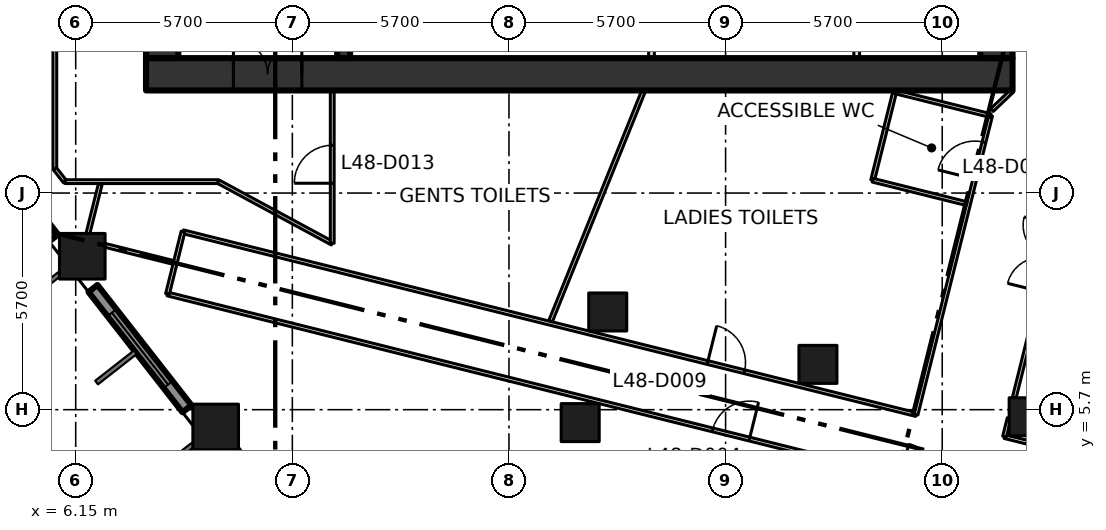
"""IFC4 building model, lengths in metres.
Left out: names, types, materials, properties, quantities, classifications, styles, units other than length and angle.
Written with IfcOpenShell. Run it as: python <this file> out.ifc"""

import sys

from ifc_helpers import new_model, si_unit, direction, frame, frame_2d, origin, origin_2d, place, context, subcontext, project, spatial, rectangle, extrude, element, fill, save


model = new_model("IFC4")
c1 = context("Model", 3, precision=1e-05, world=origin(), true_north=direction((0.0, 1.0)))
c2 = subcontext(c1, "Body", "Model", "MODEL_VIEW")
j1 = project(units=[si_unit("LENGTHUNIT", "METRE"), si_unit("PLANEANGLEUNIT", "RADIAN")], contexts=[c1])
p1 = place(None, origin())
s1 = spatial("IfcSite", under=j1, at=p1, CompositionType="ELEMENT")
p2 = place(p1, origin())
s2 = spatial("IfcBuilding", under=s1, at=p2, CompositionType="ELEMENT")
p3 = place(p2, frame((0.0, 0.0, 211.8)))
s3 = spatial("IfcBuildingStorey", under=s2, at=p3, CompositionType="ELEMENT", Elevation=211.8)
for number, where, z_axis, x_axis in (
    (1, (9.833, 5.245, 0.0), (0.0, 0.0, 1.0), (1.0, 0.0, 0.0)),
    (2, (6.323, 9.737, 0.0), (0.0, 0.0, 1.0), (1.0, 0.0, 0.0)),
):
    element("IfcColumn", number, at=place(p3, frame(where, z_axis=z_axis, x_axis=x_axis)), inside=s3, PredefinedType="COLUMN", context=c2, shape_type="SweptSolid", body=[
        extrude(rectangle(XDim=1.2, YDim=1.2, at=origin_2d()), origin(), (0.0, 0.0, 1.0), 4.2),
    ])
for number, where, z_axis, x_axis in (
    (3, (19.424, 5.36, 0.0), (0.0, 0.0, 1.0), (1.0, 0.0, 0.0)),
    (4, (20.149, 8.271, 0.0), (0.0, 0.0, 1.0), (1.0, 0.0, 0.0)),
    (5, (25.68, 6.892, 0.0), (0.0, 0.0, 1.0), (1.0, 0.0, 0.0)),
    (6, (31.211, 5.513, 0.0), (0.0, 0.0, 1.0), (1.0, 0.0, 0.0)),
):
    element("IfcColumn", number, at=place(p3, frame(where, z_axis=z_axis, x_axis=x_axis)), inside=s3, PredefinedType="COLUMN", context=c2, shape_type="SweptSolid", body=[
        extrude(rectangle(XDim=1.0, YDim=1.0, at=origin_2d()), origin(), (0.0, 0.0, 1.0), 4.2),
    ])
p4 = place(p3, frame((8.0, 14.525, -0.3), z_axis=(0.0, 0.0, 1.0), x_axis=(1.0, 0.0, 0.0)))
e7 = element("IfcWall", 7, at=p4, inside=s3, PredefinedType="SHEAR", context=c2, shape_type="SweptSolid", body=[
    extrude(rectangle(XDim=22.8, YDim=0.85, at=frame_2d((11.4, 0.0))), origin(), (0.0, 0.0, 1.0), 4.2),
])
p5 = place(p4, frame((2.3, 0.0, 0.3)))
e8 = element("IfcOpeningElement", 8, at=p5, cuts=e7, PredefinedType="OPENING", context=c2, shape_type="SweptSolid", body=[
    extrude(rectangle(XDim=1.8, YDim=2.1, at=frame_2d((0.9, 1.05))), frame((0.0, 0.435, 0.0), z_axis=(0.0, -1.0, 0.0), x_axis=(1.0, 0.0, 0.0)), (0.0, 0.0, 1.0), 0.87),
])
for number, where, z_axis, x_axis in (
    (9, (8.425, 14.95, -0.3), (0.0, 0.0, 1.0), (0.0, 1.0, 0.0)),
    (10, (30.375, 14.95, -0.3), (0.0, 0.0, 1.0), (0.0, 1.0, 0.0)),
):
    element("IfcWall", number, at=place(p3, frame(where, z_axis=z_axis, x_axis=x_axis)), inside=s3, PredefinedType="SHEAR", context=c2, shape_type="SweptSolid", body=[
        extrude(rectangle(XDim=20.75, YDim=0.85, at=frame_2d((10.375, 0.0))), origin(), (0.0, 0.0, 1.0), 4.2),
    ])
p6 = place(p3, frame((13.2, 14.95, 0.0), z_axis=(0.0, 0.0, 1.0), x_axis=(0.0, 1.0, 0.0)))
e11 = element("IfcWall", 11, at=p6, inside=s3, PredefinedType="SHEAR", context=c2, shape_type="SweptSolid", body=[
    extrude(rectangle(XDim=20.75, YDim=0.34, at=frame_2d((10.375, 0.0))), origin(), (0.0, 0.0, 1.0), 3.9),
])
p7 = place(p6, frame((3.35, 0.0, 0.0)))
e12 = element("IfcOpeningElement", 12, at=p7, cuts=e11, PredefinedType="OPENING", context=c2, shape_type="SweptSolid", body=[
    extrude(rectangle(XDim=1.8, YDim=2.1, at=frame_2d((0.9, 1.05))), frame((0.0, 0.18, 0.0), z_axis=(0.0, -1.0, 0.0), x_axis=(1.0, 0.0, 0.0)), (0.0, 0.0, 1.0), 0.36),
])
p8 = place(p6, frame((11.45, 0.0, 0.0)))
e13 = element("IfcOpeningElement", 13, at=p8, cuts=e11, PredefinedType="OPENING", context=c2, shape_type="SweptSolid", body=[
    extrude(rectangle(XDim=1.2, YDim=2.1, at=frame_2d((0.6, 1.05))), frame((0.0, 0.18, 0.0), z_axis=(0.0, -1.0, 0.0), x_axis=(1.0, 0.0, 0.0)), (0.0, 0.0, 1.0), 0.36),
])
for number, where, z_axis, x_axis in (
    (14, (21.3, 14.95, 0.0), (0.0, 0.0, 1.0), (0.0, 1.0, 0.0)),
    (15, (26.7, 14.95, 0.0), (0.0, 0.0, 1.0), (0.0, 1.0, 0.0)),
):
    element("IfcWall", number, at=place(p3, frame(where, z_axis=z_axis, x_axis=x_axis)), inside=s3, PredefinedType="PARTITIONING", context=c2, shape_type="SweptSolid", body=[
        extrude(rectangle(XDim=2.675, YDim=0.15, at=frame_2d((1.337, 0.0))), origin(), (0.0, 0.0, 1.0), 3.9),
    ])
p9 = place(p3, frame((3.096, 13.381, 0.0), z_axis=(0.0, 0.0, 1.0), x_axis=(0.615563820493, -0.78808704018, 0.0)))
e16 = element("IfcWall", 16, at=p9, inside=s3, PredefinedType="SOLIDWALL", context=c2, shape_type="SweptSolid", body=[
    extrude(rectangle(XDim=4.016, YDim=0.3, at=frame_2d((2.008, 0.0))), origin(), (0.0, 0.0, 1.0), 3.15),
])
p10 = place(p9, frame((0.808, 0.0, 0.8)))
e17 = element("IfcOpeningElement", 17, at=p10, cuts=e16, PredefinedType="OPENING", context=c2, shape_type="SweptSolid", body=[
    extrude(rectangle(XDim=2.4, YDim=2.1, at=frame_2d((1.2, 1.05))), frame((0.0, 0.16, 0.0), z_axis=(0.0, -1.0, 0.0), x_axis=(1.0, 0.0, 0.0)), (0.0, 0.0, 1.0), 0.32),
])
p11 = place(p3, frame((6.605, 8.889, 0.0), z_axis=(0.0, 0.0, 1.0), x_axis=(0.615706559089, -0.787975528233, 0.0)))
e18 = element("IfcWall", 18, at=p11, inside=s3, PredefinedType="SOLIDWALL", context=c2, shape_type="SweptSolid", body=[
    extrude(rectangle(XDim=4.016, YDim=0.3, at=frame_2d((2.008, 0.0))), origin(), (0.0, 0.0, 1.0), 3.15),
])
p12 = place(p11, frame((0.808, 0.0, 0.8)))
e19 = element("IfcOpeningElement", 19, at=p12, cuts=e18, PredefinedType="OPENING", context=c2, shape_type="SweptSolid", body=[
    extrude(rectangle(XDim=2.4, YDim=2.1, at=frame_2d((1.2, 1.05))), frame((0.0, 0.16, 0.0), z_axis=(0.0, -1.0, 0.0), x_axis=(1.0, 0.0, 0.0)), (0.0, 0.0, 1.0), 0.32),
])
p13 = place(p3, frame((10.302, 4.645, 0.0), z_axis=(0.0, 0.0, 1.0), x_axis=(0.615634966381, -0.788031463946, 0.0)))
e20 = element("IfcWall", 20, at=p13, inside=s3, PredefinedType="SOLIDWALL", context=c2, shape_type="SweptSolid", body=[
    extrude(rectangle(XDim=4.176, YDim=0.2, at=frame_2d((2.088, 0.0))), origin(), (0.0, 0.0, 1.0), 3.15),
])
p14 = place(p13, frame((1.188, 0.0, 0.0)))
e21 = element("IfcOpeningElement", 21, at=p14, cuts=e20, PredefinedType="OPENING", context=c2, shape_type="SweptSolid", body=[
    extrude(rectangle(XDim=1.8, YDim=2.9, at=frame_2d((0.9, 1.45))), frame((0.0, 0.11, 0.0), z_axis=(0.0, -1.0, 0.0), x_axis=(1.0, 0.0, 0.0)), (0.0, 0.0, 1.0), 0.22),
])
p15 = place(p3, frame((5.6, 12.043, 0.0), z_axis=(0.0, 0.0, 1.0), x_axis=(0.0, 1.0, 0.0)))
e22 = element("IfcWall", 22, at=p15, inside=s3, PredefinedType="PARTITIONING", context=c2, shape_type="SweptSolid", body=[
    extrude(rectangle(XDim=27.257, YDim=0.1, at=frame_2d((13.628, 0.0))), origin(), (0.0, 0.0, 1.0), 3.9),
])
p16 = place(p15, frame((5.78, 0.0, 0.0)))
e23 = element("IfcOpeningElement", 23, at=p16, cuts=e22, PredefinedType="OPENING", context=c2, shape_type="SweptSolid", body=[
    extrude(rectangle(XDim=1.0, YDim=2.1, at=frame_2d((0.5, 1.05))), frame((0.0, 0.06, 0.0), z_axis=(0.0, -1.0, 0.0), x_axis=(1.0, 0.0, 0.0)), (0.0, 0.0, 1.0), 0.12),
])
p17 = place(p15, frame((17.329, 0.0, 0.0)))
e24 = element("IfcOpeningElement", 24, at=p17, cuts=e22, PredefinedType="OPENING", context=c2, shape_type="SweptSolid", body=[
    extrude(rectangle(XDim=1.0, YDim=2.1, at=frame_2d((0.5, 1.05))), frame((0.0, 0.06, 0.0), z_axis=(0.0, -1.0, 0.0), x_axis=(1.0, 0.0, 0.0)), (0.0, 0.0, 1.0), 0.12),
])
p18 = place(p15, frame((24.229, 0.0, 0.0)))
e25 = element("IfcOpeningElement", 25, at=p18, cuts=e22, PredefinedType="OPENING", context=c2, shape_type="SweptSolid", body=[
    extrude(rectangle(XDim=1.8, YDim=2.1, at=frame_2d((0.9, 1.05))), frame((0.0, 0.06, 0.0), z_axis=(0.0, -1.0, 0.0), x_axis=(1.0, 0.0, 0.0)), (0.0, 0.0, 1.0), 0.12),
])
p19 = place(p3, frame((5.6, 12.043, 0.0), z_axis=(0.0, 0.0, 1.0), x_axis=(0.615415398102, -0.788202948344, 0.0)))
e26 = element("IfcWall", 26, at=p19, inside=s3, PredefinedType="PARTITIONING", context=c2, shape_type="SweptSolid", body=[
    extrude(rectangle(XDim=0.435, YDim=0.1, at=frame_2d((0.218, 0.0))), origin(), (0.0, 0.0, 1.0), 3.9),
])
p20 = place(p3, frame((5.868, 11.7, 0.0), z_axis=(0.0, 0.0, 1.0), x_axis=(1.0, 0.0, 0.0)))
e27 = element("IfcWall", 27, at=p20, inside=s3, PredefinedType="PARTITIONING", context=c2, shape_type="SweptSolid", body=[
    extrude(rectangle(XDim=4.032, YDim=0.1, at=frame_2d((2.016, 0.0))), origin(), (0.0, 0.0, 1.0), 3.9),
])
p21 = place(p3, frame((8.565, 8.744, 0.0), z_axis=(0.0, 0.0, 1.0), x_axis=(0.970296742948, -0.241917817915, 0.0)))
e28 = element("IfcWall", 28, at=p21, inside=s3, PredefinedType="PARTITIONING", context=c2, shape_type="SweptSolid", body=[
    extrude(rectangle(XDim=57.374, YDim=0.1, at=frame_2d((28.687, 0.0))), origin(), (0.0, 0.0, 1.0), 3.9),
])
p22 = place(p21, frame((48.091, 0.0, 0.0)))
e29 = element("IfcOpeningElement", 29, at=p22, cuts=e28, PredefinedType="OPENING", context=c2, shape_type="SweptSolid", body=[
    extrude(rectangle(XDim=1.8, YDim=2.1, at=frame_2d((0.9, 1.05))), frame((0.0, 0.06, 0.0), z_axis=(0.0, -1.0, 0.0), x_axis=(1.0, 0.0, 0.0)), (0.0, 0.0, 1.0), 0.12),
])
p23 = place(p21, frame((14.78, 0.0, 0.0)))
e30 = element("IfcOpeningElement", 30, at=p23, cuts=e28, PredefinedType="OPENING", context=c2, shape_type="SweptSolid", body=[
    extrude(rectangle(XDim=1.0, YDim=2.1, at=frame_2d((0.5, 1.05))), frame((0.0, 0.06, 0.0), z_axis=(0.0, -1.0, 0.0), x_axis=(1.0, 0.0, 0.0)), (0.0, 0.0, 1.0), 0.12),
])
p24 = place(p21, frame((19.88, 0.0, 0.0)))
e31 = element("IfcOpeningElement", 31, at=p24, cuts=e28, PredefinedType="OPENING", context=c2, shape_type="SweptSolid", body=[
    extrude(rectangle(XDim=1.8, YDim=2.1, at=frame_2d((0.9, 1.05))), frame((0.0, 0.06, 0.0), z_axis=(0.0, -1.0, 0.0), x_axis=(1.0, 0.0, 0.0)), (0.0, 0.0, 1.0), 0.12),
])
p25 = place(p3, frame((8.973, 10.382, 0.0), z_axis=(0.0, 0.0, 1.0), x_axis=(0.970286808807, -0.241957658808, 0.0)))
e32 = element("IfcWall", 32, at=p25, inside=s3, PredefinedType="PARTITIONING", context=c2, shape_type="SweptSolid", body=[
    extrude(rectangle(XDim=19.88, YDim=0.1, at=frame_2d((9.94, 0.0))), origin(), (0.0, 0.0, 1.0), 3.9),
])
p26 = place(p25, frame((14.225, 0.0, 0.0)))
e33 = element("IfcOpeningElement", 33, at=p26, cuts=e32, PredefinedType="OPENING", context=c2, shape_type="SweptSolid", body=[
    extrude(rectangle(XDim=1.0, YDim=2.1, at=frame_2d((0.5, 1.05))), frame((0.0, 0.06, 0.0), z_axis=(0.0, -1.0, 0.0), x_axis=(1.0, 0.0, 0.0)), (0.0, 0.0, 1.0), 0.12),
])
p27 = place(p3, frame((8.973, 10.382, 0.0), z_axis=(0.0, 0.0, 1.0), x_axis=(-0.241650823739, -0.970363271866, 0.0)))
e34 = element("IfcWall", 34, at=p27, inside=s3, PredefinedType="PARTITIONING", context=c2, shape_type="SweptSolid", body=[
    extrude(rectangle(XDim=1.688, YDim=0.1, at=frame_2d((0.844, 0.0))), origin(), (0.0, 0.0, 1.0), 3.9),
])
p28 = place(p3, frame((9.9, 11.7, 0.0), z_axis=(0.0, 0.0, 1.0), x_axis=(0.87965147249, -0.475618846291, 0.0)))
e35 = element("IfcWall", 35, at=p28, inside=s3, PredefinedType="PARTITIONING", context=c2, shape_type="SweptSolid", body=[
    extrude(rectangle(XDim=3.41, YDim=0.1, at=frame_2d((1.705, 0.0))), origin(), (0.0, 0.0, 1.0), 3.9),
])
p29 = place(p3, frame((12.9, 10.078, 0.0), z_axis=(0.0, 0.0, 1.0), x_axis=(0.0, 1.0, 0.0)))
e36 = element("IfcWall", 36, at=p29, inside=s3, PredefinedType="PARTITIONING", context=c2, shape_type="SweptSolid", body=[
    extrude(rectangle(XDim=4.022, YDim=0.1, at=frame_2d((2.011, 0.0))), origin(), (0.0, 0.0, 1.0), 3.9),
])
p30 = place(p29, frame((1.58, 0.0, 0.0)))
e37 = element("IfcOpeningElement", 37, at=p30, cuts=e36, PredefinedType="OPENING", context=c2, shape_type="SweptSolid", body=[
    extrude(rectangle(XDim=1.0, YDim=2.1, at=frame_2d((0.5, 1.05))), frame((0.0, 0.06, 0.0), z_axis=(0.0, -1.0, 0.0), x_axis=(1.0, 0.0, 0.0)), (0.0, 0.0, 1.0), 0.12),
])
p31 = place(p3, frame((28.262, 5.572, 0.0), z_axis=(0.0, 0.0, 1.0), x_axis=(0.241919014237, 0.970296444676, 0.0)))
e38 = element("IfcWall", 38, at=p31, inside=s3, PredefinedType="PARTITIONING", context=c2, shape_type="SweptSolid", body=[
    extrude(rectangle(XDim=8.106, YDim=0.1, at=frame_2d((4.053, 0.0))), origin(), (0.0, 0.0, 1.0), 3.9),
])
p32 = place(p31, frame((6.386, 0.0, 0.0)))
e39 = element("IfcOpeningElement", 39, at=p32, cuts=e38, PredefinedType="OPENING", context=c2, shape_type="SweptSolid", body=[
    extrude(rectangle(XDim=1.0, YDim=2.1, at=frame_2d((0.5, 1.05))), frame((0.0, 0.06, 0.0), z_axis=(0.0, -1.0, 0.0), x_axis=(1.0, 0.0, 0.0)), (0.0, 0.0, 1.0), 0.12),
])
p33 = place(p3, frame((30.59, 4.992, 0.0), z_axis=(0.0, 0.0, 1.0), x_axis=(0.97028916255, -0.241948219746, 0.0)))
e40 = element("IfcWall", 40, at=p33, inside=s3, PredefinedType="PARTITIONING", context=c2, shape_type="SweptSolid", body=[
    extrude(rectangle(XDim=25.526, YDim=0.1, at=frame_2d((12.763, 0.0))), origin(), (0.0, 0.0, 1.0), 3.9),
])
p34 = place(p33, frame((18.646, 0.0, 0.0)))
e41 = element("IfcOpeningElement", 41, at=p34, cuts=e40, PredefinedType="OPENING", context=c2, shape_type="SweptSolid", body=[
    extrude(rectangle(XDim=1.0, YDim=2.1, at=frame_2d((0.5, 1.05))), frame((0.0, 0.06, 0.0), z_axis=(0.0, -1.0, 0.0), x_axis=(1.0, 0.0, 0.0)), (0.0, 0.0, 1.0), 0.12),
])
p35 = place(p3, frame((30.59, 4.992, 0.0), z_axis=(0.0, 0.0, 1.0), x_axis=(0.241731207299, 0.970343250308, 0.0)))
e42 = element("IfcWall", 42, at=p35, inside=s3, PredefinedType="PARTITIONING", context=c2, shape_type="SweptSolid", body=[
    extrude(rectangle(XDim=0.5, YDim=0.1, at=frame_2d((0.25, 0.0))), origin(), (0.0, 0.0, 1.0), 3.9),
])
p36 = place(p3, frame((30.8, 14.1, 0.0), z_axis=(0.0, 0.0, 1.0), x_axis=(-0.722911025189, -0.690941133281, 0.0)))
e43 = element("IfcWall", 43, at=p36, inside=s3, PredefinedType="PARTITIONING", context=c2, shape_type="SweptSolid", body=[
    extrude(rectangle(XDim=0.748, YDim=0.1, at=frame_2d((0.374, 0.0))), origin(), (0.0, 0.0, 1.0), 3.9),
])
p37 = place(p3, frame((30.845, 6.013, 0.0), z_axis=(0.0, 0.0, 1.0), x_axis=(0.241969354343, 0.97028389225, 0.0)))
e44 = element("IfcWall", 44, at=p37, inside=s3, PredefinedType="PARTITIONING", context=c2, shape_type="SweptSolid", body=[
    extrude(rectangle(XDim=7.203, YDim=0.1, at=frame_2d((3.602, 0.0))), origin(), (0.0, 0.0, 1.0), 3.9),
])
p38 = place(p37, frame((2.88, 0.0, 0.0)))
e45 = element("IfcOpeningElement", 45, at=p38, cuts=e44, PredefinedType="OPENING", context=c2, shape_type="SweptSolid", body=[
    extrude(rectangle(XDim=1.8, YDim=2.1, at=frame_2d((0.9, 1.05))), frame((0.0, 0.06, 0.0), z_axis=(0.0, -1.0, 0.0), x_axis=(1.0, 0.0, 0.0)), (0.0, 0.0, 1.0), 0.12),
])
p39 = place(p3, frame((6.797, 11.638, 0.0), z_axis=(0.0, 0.0, 1.0), x_axis=(-0.242492789119, -0.97015320812, 0.0)))
e46 = element("IfcWall", 46, at=p39, inside=s3, PredefinedType="PARTITIONING", context=c2, shape_type="SweptSolid", body=[
    extrude(rectangle(XDim=1.341, YDim=0.1, at=frame_2d((0.67, 0.0))), origin(), (0.0, 0.0, 1.0), 3.9),
])
p40 = place(p3, frame((8.72, 9.574, 0.0), z_axis=(0.0, 0.0, 1.0), x_axis=(-0.97017350799, 0.242411559945, 0.0)))
e47 = element("IfcWall", 47, at=p40, inside=s3, PredefinedType="PARTITIONING", context=c2, shape_type="SweptSolid", body=[
    extrude(rectangle(XDim=1.852, YDim=0.1, at=frame_2d((0.926, 0.0))), origin(), (0.0, 0.0, 1.0), 3.9),
])
p41 = place(p3, frame((18.645, 8.029, 0.0), z_axis=(0.0, 0.0, 1.0), x_axis=(0.374480928684, 0.927234616509, 0.0)))
e48 = element("IfcWall", 48, at=p41, inside=s3, PredefinedType="PARTITIONING", context=c2, shape_type="SweptSolid", body=[
    extrude(rectangle(XDim=6.547, YDim=0.1, at=frame_2d((3.274, 0.0))), origin(), (0.0, 0.0, 1.0), 3.9),
])
p42 = place(p3, frame((27.119, 11.738, 0.0), z_axis=(0.0, 0.0, 1.0), x_axis=(0.242176473756, 0.970232217337, 0.0)))
e49 = element("IfcWall", 49, at=p42, inside=s3, PredefinedType="PARTITIONING", context=c2, shape_type="SweptSolid", body=[
    extrude(rectangle(XDim=2.399, YDim=0.1, at=frame_2d((1.2, 0.0))), origin(), (0.0, 0.0, 1.0), 3.9),
])
p43 = place(p3, frame((27.7, 14.066, 0.0), z_axis=(0.0, 0.0, 1.0), x_axis=(0.970307970296, -0.241872782222, 0.0)))
e50 = element("IfcWall", 50, at=p43, inside=s3, PredefinedType="PARTITIONING", context=c2, shape_type="SweptSolid", body=[
    extrude(rectangle(XDim=2.6, YDim=0.1, at=frame_2d((1.3, 0.0))), origin(), (0.0, 0.0, 1.0), 3.9),
])
p44 = place(p3, frame((29.594, 11.121, 0.0), z_axis=(0.0, 0.0, 1.0), x_axis=(-0.970311165457, 0.241859964008, 0.0)))
e51 = element("IfcWall", 51, at=p44, inside=s3, PredefinedType="PARTITIONING", context=c2, shape_type="SweptSolid", body=[
    extrude(rectangle(XDim=2.551, YDim=0.1, at=frame_2d((1.275, 0.0))), origin(), (0.0, 0.0, 1.0), 3.9),
])
p45 = place(p5, origin())
e52 = element("IfcDoor", 52, at=p45, inside=s3, OperationType="DOUBLE_DOOR_SINGLE_SWING", PredefinedType="DOOR", context=c2, shape_type="SweptSolid", body=[
    extrude(rectangle(XDim=1.8, YDim=2.1, at=frame_2d((0.9, 1.05))), frame((0.0, 0.025, 0.0), z_axis=(0.0, -1.0, 0.0), x_axis=(1.0, 0.0, 0.0)), (0.0, 0.0, 1.0), 0.05),
])
fill(e8, e52)
p46 = place(p12, origin())
e53 = element("IfcWindow", 53, at=p46, inside=s3, PartitioningType="DOUBLE_PANEL_VERTICAL", PredefinedType="WINDOW", context=c2, shape_type="SweptSolid", body=[
    extrude(rectangle(XDim=2.4, YDim=2.1, at=frame_2d((1.2, 1.05))), frame((0.0, 0.03, 0.0), z_axis=(0.0, -1.0, 0.0), x_axis=(1.0, 0.0, 0.0)), (0.0, 0.0, 1.0), 0.06),
])
fill(e19, e53)
p47 = place(p23, origin())
e54 = element("IfcDoor", 54, at=p47, inside=s3, OperationType="SINGLE_SWING_RIGHT", PredefinedType="DOOR", context=c2, shape_type="SweptSolid", body=[
    extrude(rectangle(XDim=1.0, YDim=2.1, at=frame_2d((0.5, 1.05))), frame((0.0, 0.025, 0.0), z_axis=(0.0, -1.0, 0.0), x_axis=(1.0, 0.0, 0.0)), (0.0, 0.0, 1.0), 0.05),
])
fill(e30, e54)
p48 = place(p26, origin())
e55 = element("IfcDoor", 55, at=p48, inside=s3, OperationType="SINGLE_SWING_LEFT", PredefinedType="DOOR", context=c2, shape_type="SweptSolid", body=[
    extrude(rectangle(XDim=1.0, YDim=2.1, at=frame_2d((0.5, 1.05))), frame((0.0, 0.025, 0.0), z_axis=(0.0, -1.0, 0.0), x_axis=(1.0, 0.0, 0.0)), (0.0, 0.0, 1.0), 0.05),
])
fill(e33, e55)
p49 = place(p30, origin())
e56 = element("IfcDoor", 56, at=p49, inside=s3, OperationType="SINGLE_SWING_LEFT", PredefinedType="DOOR", context=c2, shape_type="SweptSolid", body=[
    extrude(rectangle(XDim=1.0, YDim=2.1, at=frame_2d((0.5, 1.05))), frame((0.0, 0.025, 0.0), z_axis=(0.0, -1.0, 0.0), x_axis=(1.0, 0.0, 0.0)), (0.0, 0.0, 1.0), 0.05),
])
fill(e37, e56)
p50 = place(p32, origin())
e57 = element("IfcDoor", 57, at=p50, inside=s3, OperationType="SINGLE_SWING_LEFT", PredefinedType="DOOR", context=c2, shape_type="SweptSolid", body=[
    extrude(rectangle(XDim=1.0, YDim=2.1, at=frame_2d((0.5, 1.05))), frame((0.0, 0.025, 0.0), z_axis=(0.0, -1.0, 0.0), x_axis=(1.0, 0.0, 0.0)), (0.0, 0.0, 1.0), 0.05),
])
fill(e39, e57)
save(model, sys.argv[1])
